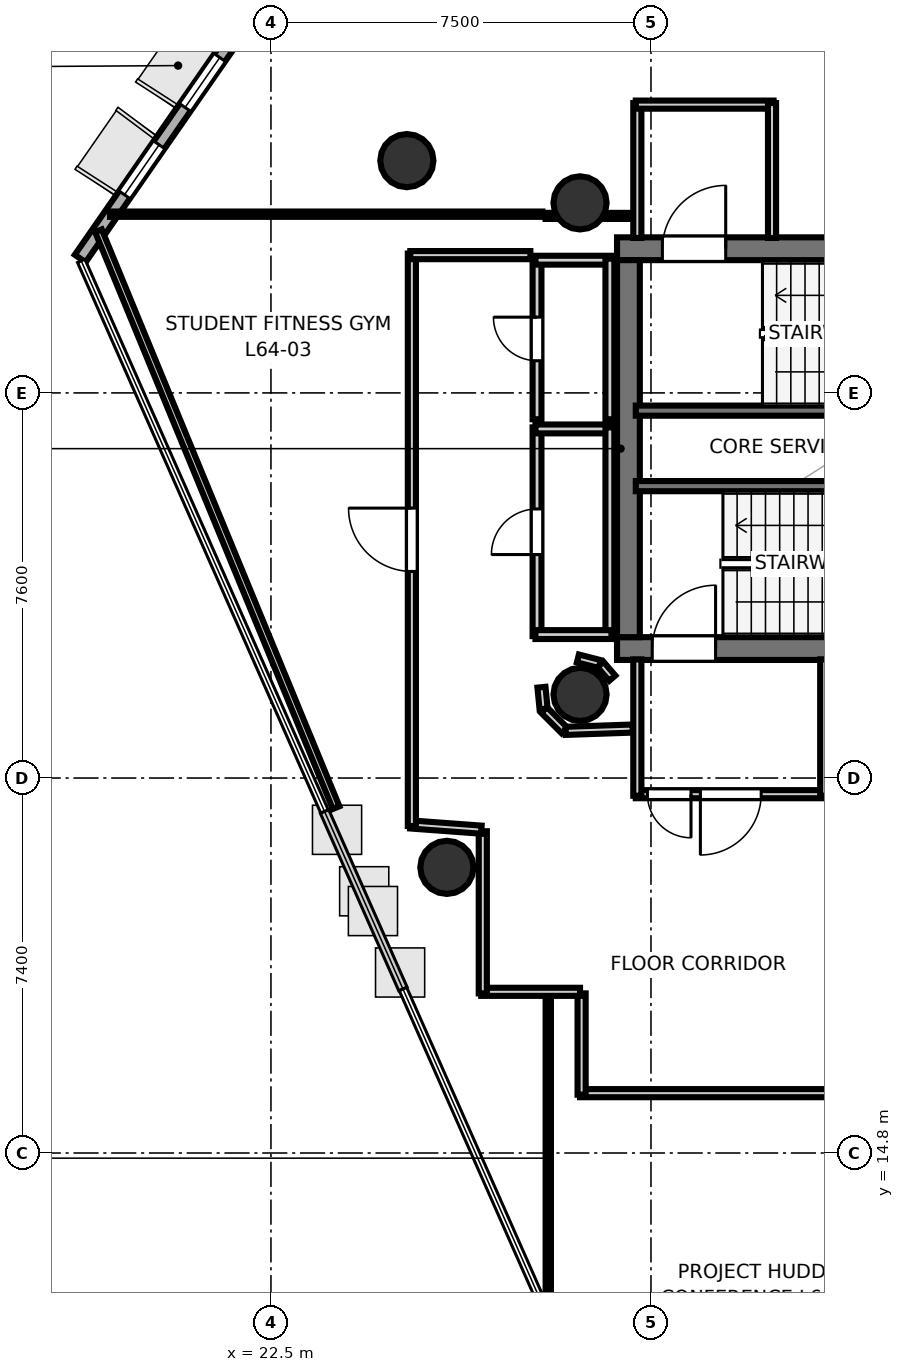
"""IFC4 building model, lengths in metres.
Left out: names, types, materials, properties, quantities, classifications, styles, units other than length and angle.
Written with IfcOpenShell. Run it as: python <this file> out.ifc"""

import sys

from ifc_helpers import new_model, si_unit, direction, frame, frame_2d, origin, origin_2d, place, context, subcontext, project, spatial, rectangle, hollow_circle, extrude, element, fill, save


model = new_model("IFC4")
c1 = context("Model", 3, precision=1e-05, world=origin(), true_north=direction((0.0, 1.0)))
c2 = subcontext(c1, "Body", "Model", "MODEL_VIEW")
j1 = project(units=[si_unit("LENGTHUNIT", "METRE"), si_unit("PLANEANGLEUNIT", "RADIAN")], contexts=[c1])
p1 = place(None, origin())
s1 = spatial("IfcSite", under=j1, at=p1, CompositionType="ELEMENT")
p2 = place(p1, origin())
s2 = spatial("IfcBuilding", under=s1, at=p2, CompositionType="ELEMENT")
p3 = place(p2, frame((0.0, 0.0, 250.1)))
s3 = spatial("IfcBuildingStorey", under=s2, at=p3, CompositionType="ELEMENT", Elevation=250.1)
p4 = place(p3, frame((29.33, 32.645, 0.0), z_axis=(0.0, 0.0, 1.0), x_axis=(1.0, 0.0, 0.0)))
e1 = element("IfcWall", 1, at=p4, inside=s3, PredefinedType="SHEAR", context=c2, shape_type="SweptSolid", body=[
    extrude(rectangle(XDim=10.52, YDim=0.45, at=frame_2d((5.26, 0.0))), origin(), (0.0, 0.0, 1.0), 3.52),
])
p5 = place(p4, frame((0.895, 0.0, 0.0)))
e2 = element("IfcOpeningElement", 2, at=p5, cuts=e1, PredefinedType="OPENING", context=c2, shape_type="SweptSolid", body=[
    extrude(rectangle(XDim=1.25, YDim=2.15, at=frame_2d((0.625, 1.075))), frame((0.0, 0.235, 0.0), z_axis=(0.0, -1.0, 0.0), x_axis=(1.0, 0.0, 0.0)), (0.0, 0.0, 1.0), 0.47),
])
p6 = place(p3, frame((29.33, 24.755, 0.0), z_axis=(0.0, 0.0, 1.0), x_axis=(1.0, 0.0, 0.0)))
e3 = element("IfcWall", 3, at=p6, inside=s3, PredefinedType="SHEAR", context=c2, shape_type="SweptSolid", body=[
    extrude(rectangle(XDim=10.52, YDim=0.45, at=frame_2d((5.26, 0.0))), origin(), (0.0, 0.0, 1.0), 3.52),
])
p7 = place(p6, frame((0.695, 0.0, 0.0)))
e4 = element("IfcOpeningElement", 4, at=p7, cuts=e3, PredefinedType="OPENING", context=c2, shape_type="SweptSolid", body=[
    extrude(rectangle(XDim=1.25, YDim=2.15, at=frame_2d((0.625, 1.075))), frame((0.0, 0.235, 0.0), z_axis=(0.0, -1.0, 0.0), x_axis=(1.0, 0.0, 0.0)), (0.0, 0.0, 1.0), 0.47),
])
p8 = place(p3, frame((29.555, 24.98, 0.0), z_axis=(0.0, 0.0, 1.0), x_axis=(0.0, 1.0, 0.0)))
e5 = element("IfcWall", 5, at=p8, inside=s3, PredefinedType="SHEAR", context=c2, shape_type="SweptSolid", body=[
    extrude(rectangle(XDim=7.44, YDim=0.45, at=frame_2d((3.72, 0.0))), origin(), (0.0, 0.0, 1.0), 3.52),
])
for number, where, z_axis, x_axis in (
    (6, (28.6, 33.55, 0.0), (0.0, 0.0, 1.0), (1.0, 0.0, 0.0)),
    (7, (28.6, 23.85, 0.0), (0.0, 0.0, 1.0), (1.0, 0.0, 0.0)),
    (8, (25.182, 34.384, 0.0), (0.0, 0.0, 1.0), (1.0, 0.0, 0.0)),
    (9, (25.972, 20.437, 0.0), (0.0, 0.0, 1.0), (1.0, 0.0, 0.0)),
):
    element("IfcColumn", number, at=place(p3, frame(where, z_axis=z_axis, x_axis=x_axis)), inside=s3, PredefinedType="COLUMN", context=c2, shape_type="SweptSolid", body=[
        extrude(hollow_circle(Radius=0.525, WallThickness=0.028, at=origin_2d()), origin(), (0.0, 0.0, 1.0), 3.7),
    ])
p9 = place(p3, frame((22.181, 37.415, 0.0), z_axis=(0.0, 0.0, 1.0), x_axis=(-0.570304180322, -0.821433589469, 0.0)))
e10 = element("IfcWall", 10, at=p9, inside=s3, PredefinedType="SOLIDWALL", context=c2, shape_type="SweptSolid", body=[
    extrude(rectangle(XDim=6.042, YDim=0.26, at=frame_2d((3.021, 0.0))), origin(), (0.0, 0.0, 1.0), 3.52),
])
p10 = place(p9, frame((1.213, 0.0, 0.9)))
e11 = element("IfcOpeningElement", 11, at=p10, cuts=e10, PredefinedType="OPENING", context=c2, shape_type="SweptSolid", body=[
    extrude(rectangle(XDim=1.2, YDim=2.0, at=frame_2d((0.6, 1.0))), frame((0.0, 0.14, 0.0), z_axis=(0.0, -1.0, 0.0), x_axis=(1.0, 0.0, 0.0)), (0.0, 0.0, 1.0), 0.28),
])
p11 = place(p9, frame((3.31, 0.0, 0.9)))
e12 = element("IfcOpeningElement", 12, at=p11, cuts=e10, PredefinedType="OPENING", context=c2, shape_type="SweptSolid", body=[
    extrude(rectangle(XDim=1.2, YDim=2.0, at=frame_2d((0.6, 1.0))), frame((0.0, 0.14, 0.0), z_axis=(0.0, -1.0, 0.0), x_axis=(1.0, 0.0, 0.0)), (0.0, 0.0, 1.0), 0.28),
])
p12 = place(p3, frame((29.7, 29.45, 0.0), z_axis=(0.0, 0.0, 1.0), x_axis=(1.0, 0.0, 0.0)))
e13 = element("IfcWall", 13, at=p12, inside=s3, PredefinedType="SOLIDWALL", context=c2, shape_type="SweptSolid", body=[
    extrude(rectangle(XDim=8.3, YDim=0.2, at=frame_2d((4.15, 0.0))), origin(), (0.0, 0.0, 1.0), 3.52),
])
p13 = place(p3, frame((29.7, 27.96, 0.0), z_axis=(0.0, 0.0, 1.0), x_axis=(1.0, 0.0, 0.0)))
e14 = element("IfcWall", 14, at=p13, inside=s3, PredefinedType="SOLIDWALL", context=c2, shape_type="SweptSolid", body=[
    extrude(rectangle(XDim=7.75, YDim=0.2, at=frame_2d((3.875, 0.0))), origin(), (0.0, 0.0, 1.0), 3.52),
])
p14 = place(p3, frame((29.731, 32.858, 0.0), z_axis=(0.0, 0.0, 1.0), x_axis=(0.0, 1.0, 0.0)))
e15 = element("IfcWall", 15, at=p14, inside=s3, PredefinedType="PARTITIONING", context=c2, shape_type="SweptSolid", body=[
    extrude(rectangle(XDim=2.662, YDim=0.16, at=frame_2d((1.331, 0.0))), origin(), (0.0, 0.0, 1.0), 2.84),
])
p15 = place(p3, frame((29.7, 35.489, 0.0), z_axis=(0.0, 0.0, 1.0), x_axis=(1.0, 0.0, 0.0)))
e16 = element("IfcWall", 16, at=p15, inside=s3, PredefinedType="PARTITIONING", context=c2, shape_type="SweptSolid", body=[
    extrude(rectangle(XDim=2.72, YDim=0.16, at=frame_2d((1.36, 0.0))), origin(), (0.0, 0.0, 1.0), 2.84),
])
p16 = place(p3, frame((32.389, 35.52, 0.0), z_axis=(0.0, 0.0, 1.0), x_axis=(0.0, -1.0, 0.0)))
e17 = element("IfcWall", 17, at=p16, inside=s3, PredefinedType="PARTITIONING", context=c2, shape_type="SweptSolid", body=[
    extrude(rectangle(XDim=2.662, YDim=0.16, at=frame_2d((1.331, 0.0))), origin(), (0.0, 0.0, 1.0), 2.84),
])
p17 = place(p3, frame((33.45, 21.881, 0.0), z_axis=(0.0, 0.0, 1.0), x_axis=(-1.0, 0.0, 0.0)))
e18 = element("IfcWall", 18, at=p17, inside=s3, PredefinedType="PARTITIONING", context=c2, shape_type="SweptSolid", body=[
    extrude(rectangle(XDim=3.75, YDim=0.16, at=frame_2d((1.875, 0.0))), origin(), (0.0, 0.0, 1.0), 2.84),
])
p18 = place(p17, frame((1.275, 0.0, 0.0)))
e19 = element("IfcOpeningElement", 19, at=p18, cuts=e18, PredefinedType="OPENING", context=c2, shape_type="SweptSolid", body=[
    extrude(rectangle(XDim=1.2, YDim=2.15, at=frame_2d((0.6, 1.075))), frame((0.0, 0.09, 0.0), z_axis=(0.0, -1.0, 0.0), x_axis=(1.0, 0.0, 0.0)), (0.0, 0.0, 1.0), 0.18),
])
p19 = place(p17, frame((2.66, 0.0, 0.0)))
e20 = element("IfcOpeningElement", 20, at=p19, cuts=e18, PredefinedType="OPENING", context=c2, shape_type="SweptSolid", body=[
    extrude(rectangle(XDim=0.86, YDim=2.05, at=frame_2d((0.43, 1.025))), frame((0.0, 0.09, 0.0), z_axis=(0.0, -1.0, 0.0), x_axis=(1.0, 0.0, 0.0)), (0.0, 0.0, 1.0), 0.18),
])
for number, where, z_axis, x_axis in (
    (21, (29.731, 21.85, 0.0), (0.0, 0.0, 1.0), (0.0, 1.0, 0.0)),
    (22, (33.419, 24.542, 0.0), (0.0, 0.0, 1.0), (0.0, -1.0, 0.0)),
):
    element("IfcWall", number, at=place(p3, frame(where, z_axis=z_axis, x_axis=x_axis)), inside=s3, PredefinedType="PARTITIONING", context=c2, shape_type="SweptSolid", body=[
        extrude(rectangle(XDim=2.692, YDim=0.16, at=frame_2d((1.346, 0.0))), origin(), (0.0, 0.0, 1.0), 2.84),
    ])
p20 = place(p3, frame((27.751, 25.0, 0.0), z_axis=(0.0, 0.0, 1.0), x_axis=(0.0, 1.0, 0.0)))
e23 = element("IfcWall", 23, at=p20, inside=s3, PredefinedType="PLUMBINGWALL", context=c2, shape_type="SweptSolid", body=[
    extrude(rectangle(XDim=4.12, YDim=0.175, at=frame_2d((2.06, 0.0))), origin(), (0.0, 0.0, 1.0), 2.84),
])
p21 = place(p20, frame((1.61, 0.0, 0.0)))
e24 = element("IfcOpeningElement", 24, at=p21, cuts=e23, PredefinedType="OPENING", context=c2, shape_type="SweptSolid", body=[
    extrude(rectangle(XDim=0.9, YDim=2.1, at=frame_2d((0.45, 1.05))), frame((0.0, 0.097, 0.0), z_axis=(0.0, -1.0, 0.0), x_axis=(1.0, 0.0, 0.0)), (0.0, 0.0, 1.0), 0.195),
])
p22 = place(p3, frame((27.72, 29.089, 0.0), z_axis=(0.0, 0.0, 1.0), x_axis=(1.0, 0.0, 0.0)))
e25 = element("IfcWall", 25, at=p22, inside=s3, PredefinedType="PLUMBINGWALL", context=c2, shape_type="SweptSolid", body=[
    extrude(rectangle(XDim=1.5, YDim=0.175, at=frame_2d((0.75, 0.0))), origin(), (0.0, 0.0, 1.0), 2.84),
])
p23 = place(p3, frame((29.189, 29.12, 0.0), z_axis=(0.0, 0.0, 1.0), x_axis=(0.0, -1.0, 0.0)))
e26 = element("IfcWall", 26, at=p23, inside=s3, PredefinedType="PLUMBINGWALL", context=c2, shape_type="SweptSolid", body=[
    extrude(rectangle(XDim=4.12, YDim=0.175, at=frame_2d((2.06, 0.0))), origin(), (0.0, 0.0, 1.0), 2.84),
])
p24 = place(p3, frame((29.22, 25.031, 0.0), z_axis=(0.0, 0.0, 1.0), x_axis=(-1.0, 0.0, 0.0)))
e27 = element("IfcWall", 27, at=p24, inside=s3, PredefinedType="PLUMBINGWALL", context=c2, shape_type="SweptSolid", body=[
    extrude(rectangle(XDim=1.5, YDim=0.175, at=frame_2d((0.75, 0.0))), origin(), (0.0, 0.0, 1.0), 2.84),
])
p25 = place(p3, frame((27.751, 29.28, 0.0), z_axis=(0.0, 0.0, 1.0), x_axis=(0.0, 1.0, 0.0)))
e28 = element("IfcWall", 28, at=p25, inside=s3, PredefinedType="PLUMBINGWALL", context=c2, shape_type="SweptSolid", body=[
    extrude(rectangle(XDim=3.17, YDim=0.175, at=frame_2d((1.585, 0.0))), origin(), (0.0, 0.0, 1.0), 2.84),
])
p26 = place(p25, frame((1.155, 0.0, 0.0)))
e29 = element("IfcOpeningElement", 29, at=p26, cuts=e28, PredefinedType="OPENING", context=c2, shape_type="SweptSolid", body=[
    extrude(rectangle(XDim=0.86, YDim=2.05, at=frame_2d((0.43, 1.025))), frame((0.0, 0.097, 0.0), z_axis=(0.0, -1.0, 0.0), x_axis=(1.0, 0.0, 0.0)), (0.0, 0.0, 1.0), 0.195),
])
p27 = place(p3, frame((27.72, 32.419, 0.0), z_axis=(0.0, 0.0, 1.0), x_axis=(1.0, 0.0, 0.0)))
e30 = element("IfcWall", 30, at=p27, inside=s3, PredefinedType="PLUMBINGWALL", context=c2, shape_type="SweptSolid", body=[
    extrude(rectangle(XDim=1.5, YDim=0.175, at=frame_2d((0.75, 0.0))), origin(), (0.0, 0.0, 1.0), 2.84),
])
p28 = place(p3, frame((29.189, 32.45, 0.0), z_axis=(0.0, 0.0, 1.0), x_axis=(0.0, -1.0, 0.0)))
e31 = element("IfcWall", 31, at=p28, inside=s3, PredefinedType="PLUMBINGWALL", context=c2, shape_type="SweptSolid", body=[
    extrude(rectangle(XDim=3.17, YDim=0.175, at=frame_2d((1.585, 0.0))), origin(), (0.0, 0.0, 1.0), 2.84),
])
p29 = place(p3, frame((29.236, 24.17, 0.0), z_axis=(0.0, 0.0, 1.0), x_axis=(-0.652260263346, 0.757995084984, 0.0)))
e32 = element("IfcWall", 32, at=p29, inside=s3, PredefinedType="PARTITIONING", context=c2, shape_type="SweptSolid", body=[
    extrude(rectangle(XDim=0.355, YDim=0.16, at=frame_2d((0.178, 0.0))), origin(), (0.0, 0.0, 1.0), 2.84),
])
p30 = place(p3, frame((28.988, 24.45, 0.0), z_axis=(0.0, 0.0, 1.0), x_axis=(-0.968704505916, 0.248216800836, 0.0)))
e33 = element("IfcWall", 33, at=p30, inside=s3, PredefinedType="PARTITIONING", context=c2, shape_type="SweptSolid", body=[
    extrude(rectangle(XDim=0.445, YDim=0.16, at=frame_2d((0.222, 0.0))), origin(), (0.0, 0.0, 1.0), 2.84),
])
p31 = place(p3, frame((27.838, 23.992, 0.0), z_axis=(0.0, 0.0, 1.0), x_axis=(0.098273407977, -0.995159453196, 0.0)))
e34 = element("IfcWall", 34, at=p31, inside=s3, PredefinedType="PARTITIONING", context=c2, shape_type="SweptSolid", body=[
    extrude(rectangle(XDim=0.432, YDim=0.16, at=frame_2d((0.216, 0.0))), origin(), (0.0, 0.0, 1.0), 2.84),
])
p32 = place(p3, frame((27.89, 23.543, 0.0), z_axis=(0.0, 0.0, 1.0), x_axis=(0.707106781187, -0.707106781187, 0.0)))
e35 = element("IfcWall", 35, at=p32, inside=s3, PredefinedType="PARTITIONING", context=c2, shape_type="SweptSolid", body=[
    extrude(rectangle(XDim=0.57, YDim=0.16, at=frame_2d((0.285, 0.0))), origin(), (0.0, 0.0, 1.0), 2.84),
])
p33 = place(p3, frame((28.316, 23.131, 0.0), z_axis=(0.0, 0.0, 1.0), x_axis=(0.999405342193, 0.034481328227, 0.0)))
e36 = element("IfcWall", 36, at=p33, inside=s3, PredefinedType="PARTITIONING", context=c2, shape_type="SweptSolid", body=[
    extrude(rectangle(XDim=1.324, YDim=0.16, at=frame_2d((0.662, 0.0))), origin(), (0.0, 0.0, 1.0), 2.84),
])
p34 = place(p3, frame((43.689, 15.981, 0.0), z_axis=(0.0, 0.0, 1.0), x_axis=(-1.0, 0.0, 0.0)))
e37 = element("IfcWall", 37, at=p34, inside=s3, PredefinedType="PARTITIONING", context=c2, shape_type="SweptSolid", body=[
    extrude(rectangle(XDim=15.089, YDim=0.16, at=frame_2d((7.544, 0.0))), origin(), (0.0, 0.0, 1.0), 2.84),
])
p35 = place(p34, frame((6.957, 0.0, 0.0)))
e38 = element("IfcOpeningElement", 38, at=p35, cuts=e37, PredefinedType="OPENING", context=c2, shape_type="SweptSolid", body=[
    extrude(rectangle(XDim=1.25, YDim=2.2, at=frame_2d((0.625, 1.1))), frame((0.0, 0.09, 0.0), z_axis=(0.0, -1.0, 0.0), x_axis=(1.0, 0.0, 0.0)), (0.0, 0.0, 1.0), 0.18),
])
p36 = place(p3, frame((28.631, 15.95, 0.0), z_axis=(0.0, 0.0, 1.0), x_axis=(0.0, 1.0, 0.0)))
e39 = element("IfcWall", 39, at=p36, inside=s3, PredefinedType="PARTITIONING", context=c2, shape_type="SweptSolid", body=[
    extrude(rectangle(XDim=2.0, YDim=0.16, at=frame_2d((1.0, 0.0))), origin(), (0.0, 0.0, 1.0), 2.84),
])
p37 = place(p3, frame((28.6, 17.981, 0.0), z_axis=(0.0, 0.0, 1.0), x_axis=(-1.0, 0.0, 0.0)))
e40 = element("IfcWall", 40, at=p37, inside=s3, PredefinedType="PARTITIONING", context=c2, shape_type="SweptSolid", body=[
    extrude(rectangle(XDim=1.95, YDim=0.16, at=frame_2d((0.975, 0.0))), origin(), (0.0, 0.0, 1.0), 2.84),
])
p38 = place(p3, frame((26.681, 17.95, 0.0), z_axis=(0.0, 0.0, 1.0), x_axis=(0.0, 1.0, 0.0)))
e41 = element("IfcWall", 41, at=p38, inside=s3, PredefinedType="PARTITIONING", context=c2, shape_type="SweptSolid", body=[
    extrude(rectangle(XDim=3.2, YDim=0.16, at=frame_2d((1.6, 0.0))), origin(), (0.0, 0.0, 1.0), 2.84),
])
p39 = place(p3, frame((26.652, 21.181, 0.0), z_axis=(0.0, 0.0, 1.0), x_axis=(-0.997303696291, 0.073384857861, 0.0)))
e42 = element("IfcWall", 42, at=p39, inside=s3, PredefinedType="PARTITIONING", context=c2, shape_type="SweptSolid", body=[
    extrude(rectangle(XDim=1.404, YDim=0.16, at=frame_2d((0.702, 0.0))), origin(), (0.0, 0.0, 1.0), 2.84),
])
p40 = place(p3, frame((25.281, 21.253, 0.0), z_axis=(0.0, 0.0, 1.0), x_axis=(0.0, 1.0, 0.0)))
e43 = element("IfcWall", 43, at=p40, inside=s3, PredefinedType="PARTITIONING", context=c2, shape_type="SweptSolid", body=[
    extrude(rectangle(XDim=11.297, YDim=0.16, at=frame_2d((5.648, 0.0))), origin(), (0.0, 0.0, 1.0), 2.84),
])
p41 = place(p40, frame((5.023, 0.0, 0.0)))
e44 = element("IfcOpeningElement", 44, at=p41, cuts=e43, PredefinedType="OPENING", context=c2, shape_type="SweptSolid", body=[
    extrude(rectangle(XDim=1.25, YDim=2.2, at=frame_2d((0.625, 1.1))), frame((0.0, 0.09, 0.0), z_axis=(0.0, -1.0, 0.0), x_axis=(1.0, 0.0, 0.0)), (0.0, 0.0, 1.0), 0.18),
])
p42 = place(p3, frame((25.25, 32.519, 0.0), z_axis=(0.0, 0.0, 1.0), x_axis=(1.0, 0.0, 0.0)))
e45 = element("IfcWall", 45, at=p42, inside=s3, PredefinedType="PARTITIONING", context=c2, shape_type="SweptSolid", body=[
    extrude(rectangle(XDim=2.37, YDim=0.16, at=frame_2d((1.185, 0.0))), origin(), (0.0, 0.0, 1.0), 2.84),
])
p43 = place(p3, frame((27.973, 11.527, 0.0), z_axis=(0.0, 0.0, 1.0), x_axis=(0.0, 1.0, 0.0)))
e46 = element("IfcWall", 46, at=p43, inside=s3, PredefinedType="PARTITIONING", context=c2, shape_type="SweptSolid", body=[
    extrude(rectangle(XDim=6.343, YDim=0.105, at=frame_2d((3.172, 0.0))), origin(), (0.0, 0.0, 1.0), 2.84),
])
p44 = place(p3, frame((19.323, 33.327, 0.0), z_axis=(0.0, 0.0, 1.0), x_axis=(1.0, 0.0, 0.0)))
e47 = element("IfcWall", 47, at=p44, inside=s3, PredefinedType="PARTITIONING", context=c2, shape_type="SweptSolid", body=[
    extrude(rectangle(XDim=8.534, YDim=0.105, at=frame_2d((4.267, 0.0))), origin(), (0.0, 0.0, 1.0), 2.84),
])
p45 = place(p3, frame((23.786, 21.616, 0.0), z_axis=(0.0, 0.0, 1.0), x_axis=(-0.380926319364, 0.924605396489, 0.0)))
e48 = element("IfcWall", 48, at=p45, inside=s3, PredefinedType="PARTITIONING", context=c2, shape_type="SweptSolid", body=[
    extrude(rectangle(XDim=12.312, YDim=0.14, at=frame_2d((6.156, 0.0))), origin(), (0.0, 0.0, 1.0), 2.84),
])
p46 = place(p3, frame((29.62, 33.293, 0.0), z_axis=(0.0, 0.0, 1.0), x_axis=(-1.0, 0.0, 0.0)))
e49 = element("IfcWall", 49, at=p46, inside=s3, PredefinedType="PARTITIONING", context=c2, shape_type="SweptSolid", body=[
    extrude(rectangle(XDim=1.7, YDim=0.12, at=frame_2d((0.85, 0.0))), origin(), (0.0, 0.0, 1.0), 2.84),
])
p47 = place(p3, frame((22.064, 36.865, 0.0), z_axis=(0.0, 0.0, 1.0), x_axis=(0.999959914734, -0.008953710146, 0.0)))
e50 = element("IfcWall", 50, at=p47, inside=s3, PredefinedType="PARTITIONING", context=c2, shape_type="SweptSolid", body=[
    extrude(rectangle(XDim=34.711, YDim=0.12, at=frame_2d((17.355, 0.0))), origin(), (0.0, 0.0, 1.0), 2.84),
])
p48 = place(p5, origin())
e51 = element("IfcDoor", 51, at=p48, inside=s3, OperationType="SINGLE_SWING_RIGHT", PredefinedType="DOOR", context=c2, shape_type="SweptSolid", body=[
    extrude(rectangle(XDim=1.25, YDim=2.15, at=frame_2d((0.625, 1.075))), frame((0.0, 0.025, 0.0), z_axis=(0.0, -1.0, 0.0), x_axis=(1.0, 0.0, 0.0)), (0.0, 0.0, 1.0), 0.05),
])
fill(e2, e51)
p49 = place(p7, origin())
e52 = element("IfcDoor", 52, at=p49, inside=s3, OperationType="SINGLE_SWING_RIGHT", PredefinedType="DOOR", context=c2, shape_type="SweptSolid", body=[
    extrude(rectangle(XDim=1.25, YDim=2.15, at=frame_2d((0.625, 1.075))), frame((0.0, 0.025, 0.0), z_axis=(0.0, -1.0, 0.0), x_axis=(1.0, 0.0, 0.0)), (0.0, 0.0, 1.0), 0.05),
])
fill(e4, e52)
p50 = place(p18, origin())
e53 = element("IfcDoor", 53, at=p50, inside=s3, OperationType="SINGLE_SWING_RIGHT", PredefinedType="DOOR", context=c2, shape_type="SweptSolid", body=[
    extrude(rectangle(XDim=1.2, YDim=2.15, at=frame_2d((0.6, 1.075))), frame((0.0, 0.025, 0.0), z_axis=(0.0, -1.0, 0.0), x_axis=(1.0, 0.0, 0.0)), (0.0, 0.0, 1.0), 0.05),
])
fill(e19, e53)
p51 = place(p21, origin())
e54 = element("IfcDoor", 54, at=p51, inside=s3, OperationType="SINGLE_SWING_LEFT", PredefinedType="DOOR", context=c2, shape_type="SweptSolid", body=[
    extrude(rectangle(XDim=0.9, YDim=2.1, at=frame_2d((0.45, 1.05))), frame((0.0, 0.025, 0.0), z_axis=(0.0, -1.0, 0.0), x_axis=(1.0, 0.0, 0.0)), (0.0, 0.0, 1.0), 0.05),
])
fill(e24, e54)
p52 = place(p26, origin())
e55 = element("IfcDoor", 55, at=p52, inside=s3, OperationType="SINGLE_SWING_RIGHT", PredefinedType="DOOR", context=c2, shape_type="SweptSolid", body=[
    extrude(rectangle(XDim=0.86, YDim=2.05, at=frame_2d((0.43, 1.025))), frame((0.0, 0.025, 0.0), z_axis=(0.0, -1.0, 0.0), x_axis=(1.0, 0.0, 0.0)), (0.0, 0.0, 1.0), 0.05),
])
fill(e29, e55)
p53 = place(p19, origin())
e56 = element("IfcDoor", 56, at=p53, inside=s3, OperationType="SINGLE_SWING_LEFT", PredefinedType="DOOR", context=c2, shape_type="SweptSolid", body=[
    extrude(rectangle(XDim=0.86, YDim=2.05, at=frame_2d((0.43, 1.025))), frame((0.0, 0.025, 0.0), z_axis=(0.0, -1.0, 0.0), x_axis=(1.0, 0.0, 0.0)), (0.0, 0.0, 1.0), 0.05),
])
fill(e20, e56)
p54 = place(p41, origin())
e57 = element("IfcDoor", 57, at=p54, inside=s3, OperationType="SINGLE_SWING_RIGHT", PredefinedType="DOOR", context=c2, shape_type="SweptSolid", body=[
    extrude(rectangle(XDim=1.25, YDim=2.2, at=frame_2d((0.625, 1.1))), frame((0.0, 0.025, 0.0), z_axis=(0.0, -1.0, 0.0), x_axis=(1.0, 0.0, 0.0)), (0.0, 0.0, 1.0), 0.05),
])
fill(e44, e57)
p55 = place(p10, origin())
e58 = element("IfcWindow", 58, at=p55, inside=s3, PartitioningType="SINGLE_PANEL", PredefinedType="WINDOW", context=c2, shape_type="SweptSolid", body=[
    extrude(rectangle(XDim=1.2, YDim=2.0, at=frame_2d((0.6, 1.0))), frame((0.0, 0.03, 0.0), z_axis=(0.0, -1.0, 0.0), x_axis=(1.0, 0.0, 0.0)), (0.0, 0.0, 1.0), 0.06),
])
fill(e11, e58)
p56 = place(p11, origin())
e59 = element("IfcWindow", 59, at=p56, inside=s3, PartitioningType="SINGLE_PANEL", PredefinedType="WINDOW", context=c2, shape_type="SweptSolid", body=[
    extrude(rectangle(XDim=1.2, YDim=2.0, at=frame_2d((0.6, 1.0))), frame((0.0, 0.03, 0.0), z_axis=(0.0, -1.0, 0.0), x_axis=(1.0, 0.0, 0.0)), (0.0, 0.0, 1.0), 0.06),
])
fill(e12, e59)
save(model, sys.argv[1])
